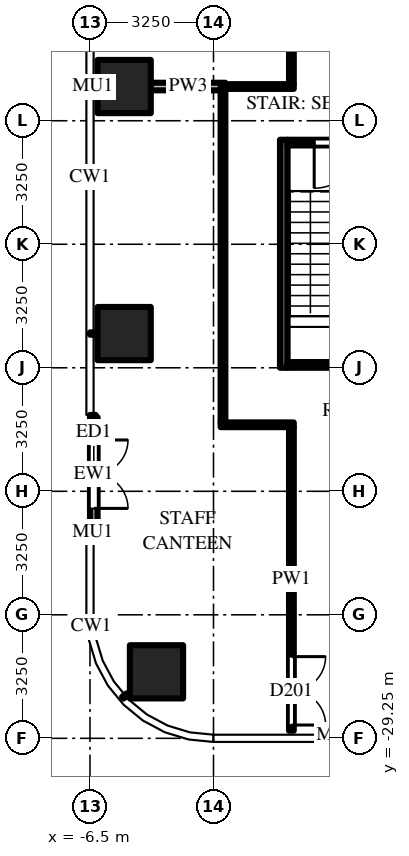
"""IFC4 building model, lengths in metres.
Left out: names, types, materials, properties, quantities, classifications, styles, units other than length and angle.
Written with IfcOpenShell. Run it as: python <this file> out.ifc"""

import sys

from ifc_helpers import new_model, si_unit, direction, frame, frame_2d, origin, origin_2d, place, context, subcontext, project, spatial, rectangle, extrude, source, transform, mapped, element, fill, save


model = new_model("IFC4")
c1 = context("Model", 3, precision=1e-05, world=origin(), true_north=direction((0.0, 1.0)))
c2 = subcontext(c1, "Body", "Model", "MODEL_VIEW")
j1 = project(units=[si_unit("LENGTHUNIT", "METRE"), si_unit("PLANEANGLEUNIT", "RADIAN")], contexts=[c1])
p1 = place(None, origin())
s1 = spatial("IfcSite", under=j1, at=p1, CompositionType="ELEMENT")
p2 = place(p1, origin())
s2 = spatial("IfcBuilding", under=s1, at=p2, CompositionType="ELEMENT")
p3 = place(p2, frame((0.0, 0.0, 52.0)))
s3 = spatial("IfcBuildingStorey", under=s2, at=p3, CompositionType="ELEMENT", Elevation=52.0)
m1 = source(origin(), c2, "Body", "SweptSolid", [
    extrude(rectangle(XDim=1.4, YDim=1.4, at=origin_2d()), origin(), (0.0, 0.0, 1.0), 4.5),
])
for number, where, z_axis, x_axis in (
    (1, (-5.6, -12.1, 0.0), (0.0, 0.0, 1.0), (1.0, 0.0, 0.0)),
    (2, (-5.6, -18.6, 0.0), (0.0, 0.0, 1.0), (1.0, 0.0, 0.0)),
    (3, (-4.75, -27.5, 0.0), (0.0, 0.0, 1.0), (1.0, 0.0, 0.0)),
):
    element("IfcColumn", number, at=place(p3, frame(where, z_axis=z_axis, x_axis=x_axis)), inside=s3, PredefinedType="COLUMN", context=c2, shape_type="MappedRepresentation", body=[
        mapped(m1, transform((0.0, 0.0, 0.0))),
    ])
m2 = source(origin(), c2, "Body", "SweptSolid", [
    extrude(rectangle(XDim=6.0, YDim=0.2, at=frame_2d((3.0, 0.0))), origin(), (0.0, 0.0, 1.0), 4.25),
])
p4 = place(p3, frame((-1.4, -13.5, 0.0), z_axis=(0.0, 0.0, 1.0), x_axis=(0.0, -1.0, 0.0)))
e4 = element("IfcWall", 4, at=p4, inside=s3, PredefinedType="SHEAR", context=c2, shape_type="MappedRepresentation", body=[
    mapped(m2, transform((0.0, 0.0, 0.0))),
])
m3 = source(origin(), c2, "Body", "SweptSolid", [
    extrude(rectangle(XDim=2.6, YDim=0.15, at=frame_2d((1.3, 0.0))), origin(), (0.0, 0.0, 1.0), 4.25),
])
p5 = place(p3, frame((1.3, -13.575, 0.0), z_axis=(0.0, 0.0, 1.0), x_axis=(-1.0, 0.0, 0.0)))
e5 = element("IfcWall", 5, at=p5, inside=s3, PredefinedType="SHEAR", context=c2, shape_type="MappedRepresentation", body=[
    mapped(m3, transform((0.0, 0.0, 0.0))),
])
m4 = source(origin(), c2, "Body", "SweptSolid", [
    extrude(rectangle(XDim=1.2, YDim=2.1, at=frame_2d((0.6, 1.05))), frame((0.0, 0.085, 0.0), z_axis=(0.0, -1.0, 0.0), x_axis=(1.0, 0.0, 0.0)), (0.0, 0.0, 1.0), 0.17),
])
p6 = place(p5, frame((0.7, 0.0, 0.0)))
e6 = element("IfcOpeningElement", 6, at=p6, cuts=e5, PredefinedType="OPENING", context=c2, shape_type="MappedRepresentation", body=[
    mapped(m4, transform((0.0, 0.0, 0.0))),
])
p7 = place(p3, frame((1.3, -19.425, 0.0), z_axis=(0.0, 0.0, 1.0), x_axis=(-1.0, 0.0, 0.0)))
e7 = element("IfcWall", 7, at=p7, inside=s3, PredefinedType="SHEAR", context=c2, shape_type="MappedRepresentation", body=[
    mapped(m3, transform((0.0, 0.0, 0.0))),
])
m5 = source(origin(), c2, "Body", "SweptSolid", [
    extrude(rectangle(XDim=3.0, YDim=0.2, at=frame_2d((1.5, 0.0))), origin(), (0.0, 0.0, 1.0), 4.25),
])
p8 = place(p3, frame((-6.4, -20.8, 0.0), z_axis=(0.0, 0.0, 1.0), x_axis=(0.0, -1.0, 0.0)))
e8 = element("IfcWall", 8, at=p8, inside=s3, PredefinedType="SOLIDWALL", context=c2, shape_type="MappedRepresentation", body=[
    mapped(m5, transform((0.0, 0.0, 0.0))),
])
m6 = source(origin(), c2, "Body", "SweptSolid", [
    extrude(rectangle(XDim=1.8, YDim=2.4, at=frame_2d((0.9, 1.2))), frame((0.0, 0.11, 0.0), z_axis=(0.0, -1.0, 0.0), x_axis=(1.0, 0.0, 0.0)), (0.0, 0.0, 1.0), 0.22),
])
p9 = place(p8, frame((0.6, 0.0, 0.0)))
e9 = element("IfcOpeningElement", 9, at=p9, cuts=e8, PredefinedType="OPENING", context=c2, shape_type="MappedRepresentation", body=[
    mapped(m6, transform((0.0, 0.0, 0.0))),
])
m7 = source(origin(), c2, "Body", "SweptSolid", [
    extrude(rectangle(XDim=8.738, YDim=0.125, at=frame_2d((4.369, 0.0))), origin(), (0.0, 0.0, 1.0), 3.468),
])
p10 = place(p3, frame((-3.0, -20.938, 0.0), z_axis=(0.0, 0.0, 1.0), x_axis=(0.0, 1.0, 0.0)))
e10 = element("IfcWall", 10, at=p10, inside=s3, PredefinedType="PARTITIONING", context=c2, shape_type="MappedRepresentation", body=[
    mapped(m7, transform((0.0, 0.0, 0.0))),
])
m8 = source(origin(), c2, "Body", "SweptSolid", [
    extrude(rectangle(XDim=7.988, YDim=0.125, at=frame_2d((3.994, 0.0))), origin(), (0.0, 0.0, 1.0), 3.33),
])
p11 = place(p3, frame((-1.2, -21.062, 0.0), z_axis=(0.0, 0.0, 1.0), x_axis=(0.0, -1.0, 0.0)))
e11 = element("IfcWall", 11, at=p11, inside=s3, PredefinedType="PARTITIONING", context=c2, shape_type="MappedRepresentation", body=[
    mapped(m8, transform((0.0, 0.0, 0.0))),
])
m9 = source(origin(), c2, "Body", "SweptSolid", [
    extrude(rectangle(XDim=1.8, YDim=2.1, at=frame_2d((0.9, 1.05))), frame((0.0, 0.073, 0.0), z_axis=(0.0, -1.0, 0.0), x_axis=(1.0, 0.0, 0.0)), (0.0, 0.0, 1.0), 0.145),
])
p12 = place(p11, frame((6.038, 0.0, 0.0)))
e12 = element("IfcOpeningElement", 12, at=p12, cuts=e11, PredefinedType="OPENING", context=c2, shape_type="MappedRepresentation", body=[
    mapped(m9, transform((0.0, 0.0, 0.0))),
])
m10 = source(origin(), c2, "Body", "SweptSolid", [
    extrude(rectangle(XDim=5.475, YDim=0.125, at=frame_2d((2.738, 0.0))), origin(), (0.0, 0.0, 1.0), 3.468),
])
p13 = place(p3, frame((-1.2, -6.562, 0.0), z_axis=(0.0, 0.0, 1.0), x_axis=(0.0, -1.0, 0.0)))
e13 = element("IfcWall", 13, at=p13, inside=s3, PredefinedType="PARTITIONING", context=c2, shape_type="MappedRepresentation", body=[
    mapped(m10, transform((0.0, 0.0, 0.0))),
])
m11 = source(origin(), c2, "Body", "SweptSolid", [
    extrude(rectangle(XDim=1.0, YDim=2.1, at=frame_2d((0.5, 1.05))), frame((0.0, 0.073, 0.0), z_axis=(0.0, -1.0, 0.0), x_axis=(1.0, 0.0, 0.0)), (0.0, 0.0, 1.0), 0.145),
])
p14 = place(p13, frame((3.538, 0.0, 0.0)))
e14 = element("IfcOpeningElement", 14, at=p14, cuts=e13, PredefinedType="OPENING", context=c2, shape_type="MappedRepresentation", body=[
    mapped(m11, transform((0.0, 0.0, 0.0))),
])
m12 = source(origin(), c2, "Body", "SweptSolid", [
    extrude(rectangle(XDim=1.925, YDim=0.125, at=frame_2d((0.962, 0.0))), origin(), (0.0, 0.0, 1.0), 4.25),
])
p15 = place(p3, frame((-1.137, -21.0, 0.0), z_axis=(0.0, 0.0, 1.0), x_axis=(-1.0, 0.0, 0.0)))
e15 = element("IfcWall", 15, at=p15, inside=s3, PredefinedType="PARTITIONING", context=c2, shape_type="MappedRepresentation", body=[
    mapped(m12, transform((0.0, 0.0, 0.0))),
])
m13 = source(origin(), c2, "Body", "SweptSolid", [
    extrude(rectangle(XDim=1.962, YDim=0.2, at=frame_2d((0.981, 0.0))), origin(), (0.0, 0.0, 1.0), 3.468),
])
p16 = place(p3, frame((-4.9, -12.1, 0.0), z_axis=(0.0, 0.0, 1.0), x_axis=(1.0, 0.0, 0.0)))
e16 = element("IfcWall", 16, at=p16, inside=s3, PredefinedType="PARTITIONING", context=c2, shape_type="MappedRepresentation", body=[
    mapped(m13, transform((0.0, 0.0, 0.0))),
])
m14 = source(origin(), c2, "Body", "SweptSolid", [
    extrude(rectangle(XDim=1.925, YDim=0.125, at=frame_2d((0.962, 0.0))), origin(), (0.0, 0.0, 1.0), 3.468),
])
p17 = place(p3, frame((-3.062, -12.1, 0.0), z_axis=(0.0, 0.0, 1.0), x_axis=(1.0, 0.0, 0.0)))
e17 = element("IfcWall", 17, at=p17, inside=s3, PredefinedType="PARTITIONING", context=c2, shape_type="MappedRepresentation", body=[
    mapped(m14, transform((0.0, 0.0, 0.0))),
])
m15 = source(origin(), c2, "Body", "SweptSolid", [
    extrude(rectangle(XDim=1.2, YDim=2.1, at=frame_2d((0.6, 1.05))), frame((0.0, 0.025, 0.0), z_axis=(0.0, -1.0, 0.0), x_axis=(1.0, 0.0, 0.0)), (0.0, 0.0, 1.0), 0.05),
])
p18 = place(p6, origin())
e18 = element("IfcDoor", 18, at=p18, inside=s3, OperationType="SINGLE_SWING_RIGHT", PredefinedType="DOOR", context=c2, shape_type="MappedRepresentation", body=[
    mapped(m15, transform((0.0, 0.0, 0.0))),
])
fill(e6, e18)
m16 = source(origin(), c2, "Body", "SweptSolid", [
    extrude(rectangle(XDim=1.8, YDim=2.4, at=frame_2d((0.9, 1.2))), frame((0.0, 0.025, 0.0), z_axis=(0.0, -1.0, 0.0), x_axis=(1.0, 0.0, 0.0)), (0.0, 0.0, 1.0), 0.05),
])
p19 = place(p9, origin())
e19 = element("IfcDoor", 19, at=p19, inside=s3, OperationType="DOUBLE_DOOR_SINGLE_SWING", PredefinedType="DOOR", context=c2, shape_type="MappedRepresentation", body=[
    mapped(m16, transform((0.0, 0.0, 0.0))),
])
fill(e9, e19)
m17 = source(origin(), c2, "Body", "SweptSolid", [
    extrude(rectangle(XDim=1.8, YDim=2.1, at=frame_2d((0.9, 1.05))), frame((0.0, 0.025, 0.0), z_axis=(0.0, -1.0, 0.0), x_axis=(1.0, 0.0, 0.0)), (0.0, 0.0, 1.0), 0.05),
])
p20 = place(p12, origin())
e20 = element("IfcDoor", 20, at=p20, inside=s3, OperationType="DOUBLE_DOOR_SINGLE_SWING", PredefinedType="DOOR", context=c2, shape_type="MappedRepresentation", body=[
    mapped(m17, transform((0.0, 0.0, 0.0))),
])
fill(e12, e20)
save(model, sys.argv[1])
